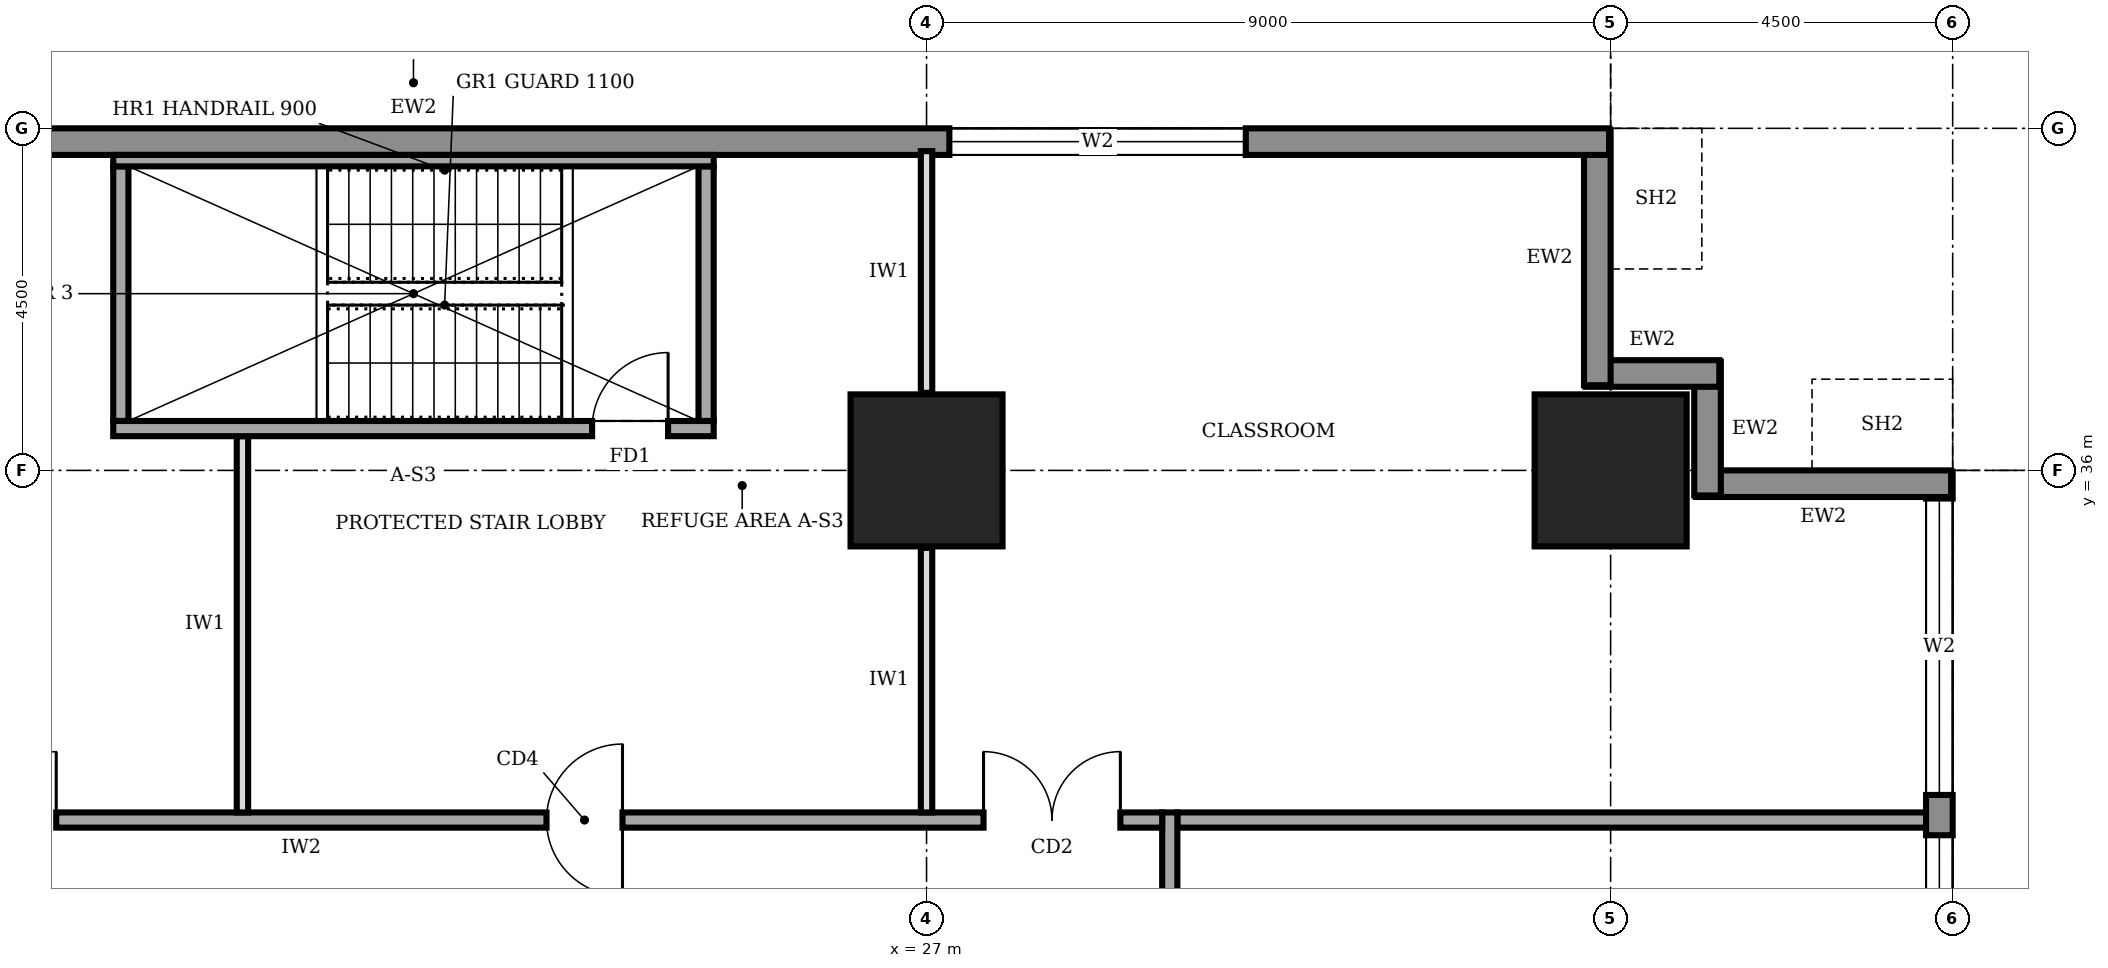
"""IFC4 building model, lengths in metres.
Left out: names, types, materials, properties, quantities, classifications, styles, units other than length and angle.
Written with IfcOpenShell. Run it as: python <this file> out.ifc"""

import sys

from ifc_helpers import new_model, si_unit, direction, frame, frame_2d, origin, origin_2d, place, context, subcontext, project, spatial, rectangle, extrude, element, fill, save


model = new_model("IFC4")
c1 = context("Model", 3, precision=1e-05, world=origin(), true_north=direction((0.0, 1.0)))
c2 = subcontext(c1, "Body", "Model", "MODEL_VIEW")
j1 = project(units=[si_unit("LENGTHUNIT", "METRE"), si_unit("PLANEANGLEUNIT", "RADIAN")], contexts=[c1])
p1 = place(None, origin())
s1 = spatial("IfcSite", under=j1, at=p1, CompositionType="ELEMENT")
p2 = place(p1, origin())
s2 = spatial("IfcBuilding", under=s1, at=p2, CompositionType="ELEMENT")
p3 = place(p2, frame((0.0, 0.0, 61.0)))
s3 = spatial("IfcBuildingStorey", under=s2, at=p3, CompositionType="ELEMENT", Elevation=61.0)
for number, where, z_axis, x_axis in (
    (1, (27.0, 36.0, 0.0), (0.0, 0.0, 1.0), (1.0, 0.0, 0.0)),
    (2, (36.0, 36.0, 0.0), (0.0, 0.0, 1.0), (1.0, 0.0, 0.0)),
):
    element("IfcColumn", number, at=place(p3, frame(where, z_axis=z_axis, x_axis=x_axis)), inside=s3, PredefinedType="COLUMN", context=c2, shape_type="SweptSolid", body=[
        extrude(rectangle(XDim=2.0, YDim=2.0, at=origin_2d()), origin(), (0.0, 0.0, 1.0), 4.0),
    ])
p4 = place(p3, frame((40.325, 4.52, 0.0), z_axis=(0.0, 0.0, 1.0), x_axis=(0.0, 1.0, 0.0)))
e3 = element("IfcWall", 3, at=p4, inside=s3, PredefinedType="STANDARD", context=c2, shape_type="SweptSolid", body=[
    extrude(rectangle(XDim=31.46, YDim=0.35, at=frame_2d((15.73, 0.0))), origin(), (0.0, 0.0, 1.0), 3.75),
])
p5 = place(p4, frame((4.78, 0.0, 0.6)))
e4 = element("IfcOpeningElement", 4, at=p5, cuts=e3, PredefinedType="OPENING", context=c2, shape_type="SweptSolid", body=[
    extrude(rectangle(XDim=3.9, YDim=2.6, at=frame_2d((1.95, 1.3))), frame((0.0, 0.185, 0.0), z_axis=(0.0, -1.0, 0.0), x_axis=(1.0, 0.0, 0.0)), (0.0, 0.0, 1.0), 0.37),
])
p6 = place(p4, frame((9.28, 0.0, 0.6)))
e5 = element("IfcOpeningElement", 5, at=p6, cuts=e3, PredefinedType="OPENING", context=c2, shape_type="SweptSolid", body=[
    extrude(rectangle(XDim=3.9, YDim=2.6, at=frame_2d((1.95, 1.3))), frame((0.0, 0.185, 0.0), z_axis=(0.0, -1.0, 0.0), x_axis=(1.0, 0.0, 0.0)), (0.0, 0.0, 1.0), 0.37),
])
p7 = place(p4, frame((13.78, 0.0, 0.6)))
e6 = element("IfcOpeningElement", 6, at=p7, cuts=e3, PredefinedType="OPENING", context=c2, shape_type="SweptSolid", body=[
    extrude(rectangle(XDim=3.9, YDim=2.6, at=frame_2d((1.95, 1.3))), frame((0.0, 0.185, 0.0), z_axis=(0.0, -1.0, 0.0), x_axis=(1.0, 0.0, 0.0)), (0.0, 0.0, 1.0), 0.37),
])
p8 = place(p4, frame((18.28, 0.0, 0.6)))
e7 = element("IfcOpeningElement", 7, at=p8, cuts=e3, PredefinedType="OPENING", context=c2, shape_type="SweptSolid", body=[
    extrude(rectangle(XDim=3.9, YDim=2.6, at=frame_2d((1.95, 1.3))), frame((0.0, 0.185, 0.0), z_axis=(0.0, -1.0, 0.0), x_axis=(1.0, 0.0, 0.0)), (0.0, 0.0, 1.0), 0.37),
])
p9 = place(p4, frame((22.78, 0.0, 0.6)))
e8 = element("IfcOpeningElement", 8, at=p9, cuts=e3, PredefinedType="OPENING", context=c2, shape_type="SweptSolid", body=[
    extrude(rectangle(XDim=3.9, YDim=2.6, at=frame_2d((1.95, 1.3))), frame((0.0, 0.185, 0.0), z_axis=(0.0, -1.0, 0.0), x_axis=(1.0, 0.0, 0.0)), (0.0, 0.0, 1.0), 0.37),
])
p10 = place(p4, frame((27.21, 0.0, 0.6)))
e9 = element("IfcOpeningElement", 9, at=p10, cuts=e3, PredefinedType="OPENING", context=c2, shape_type="SweptSolid", body=[
    extrude(rectangle(XDim=3.9, YDim=2.6, at=frame_2d((1.95, 1.3))), frame((0.0, 0.185, 0.0), z_axis=(0.0, -1.0, 0.0), x_axis=(1.0, 0.0, 0.0)), (0.0, 0.0, 1.0), 0.37),
])
p11 = place(p3, frame((40.48, 35.825, 0.0), z_axis=(0.0, 0.0, 1.0), x_axis=(-1.0, 0.0, 0.0)))
e10 = element("IfcWall", 10, at=p11, inside=s3, PredefinedType="STANDARD", context=c2, shape_type="SweptSolid", body=[
    extrude(rectangle(XDim=3.36, YDim=0.35, at=frame_2d((1.68, 0.0))), origin(), (0.0, 0.0, 1.0), 2.85),
])
for number, where, z_axis, x_axis in (
    (11, (37.275, 35.67, 0.0), (0.0, 0.0, 1.0), (0.0, 1.0, 0.0)),
    (12, (37.43, 37.275, 0.0), (0.0, 0.0, 1.0), (-1.0, 0.0, 0.0)),
):
    element("IfcWall", number, at=place(p3, frame(where, z_axis=z_axis, x_axis=x_axis)), inside=s3, PredefinedType="STANDARD", context=c2, shape_type="SweptSolid", body=[
        extrude(rectangle(XDim=1.76, YDim=0.35, at=frame_2d((0.88, 0.0))), origin(), (0.0, 0.0, 1.0), 3.75),
    ])
p12 = place(p3, frame((35.825, 37.12, 0.0), z_axis=(0.0, 0.0, 1.0), x_axis=(0.0, 1.0, 0.0)))
e13 = element("IfcWall", 13, at=p12, inside=s3, PredefinedType="STANDARD", context=c2, shape_type="SweptSolid", body=[
    extrude(rectangle(XDim=3.36, YDim=0.35, at=frame_2d((1.68, 0.0))), origin(), (0.0, 0.0, 1.0), 2.85),
])
p13 = place(p3, frame((35.98, 40.325, 0.0), z_axis=(0.0, 0.0, 1.0), x_axis=(-1.0, 0.0, 0.0)))
e14 = element("IfcWall", 14, at=p13, inside=s3, PredefinedType="STANDARD", context=c2, shape_type="SweptSolid", body=[
    extrude(rectangle(XDim=31.46, YDim=0.35, at=frame_2d((15.73, 0.0))), origin(), (0.0, 0.0, 1.0), 3.75),
])
p14 = place(p13, frame((27.21, 0.0, 0.6)))
e15 = element("IfcOpeningElement", 15, at=p14, cuts=e14, PredefinedType="OPENING", context=c2, shape_type="SweptSolid", body=[
    extrude(rectangle(XDim=3.9, YDim=2.6, at=frame_2d((1.95, 1.3))), frame((0.0, 0.185, 0.0), z_axis=(0.0, -1.0, 0.0), x_axis=(1.0, 0.0, 0.0)), (0.0, 0.0, 1.0), 0.37),
])
p15 = place(p13, frame((22.78, 0.0, 0.6)))
e16 = element("IfcOpeningElement", 16, at=p15, cuts=e14, PredefinedType="OPENING", context=c2, shape_type="SweptSolid", body=[
    extrude(rectangle(XDim=3.9, YDim=2.6, at=frame_2d((1.95, 1.3))), frame((0.0, 0.185, 0.0), z_axis=(0.0, -1.0, 0.0), x_axis=(1.0, 0.0, 0.0)), (0.0, 0.0, 1.0), 0.37),
])
p16 = place(p13, frame((4.78, 0.0, 0.6)))
e17 = element("IfcOpeningElement", 17, at=p16, cuts=e14, PredefinedType="OPENING", context=c2, shape_type="SweptSolid", body=[
    extrude(rectangle(XDim=3.9, YDim=2.6, at=frame_2d((1.95, 1.3))), frame((0.0, 0.185, 0.0), z_axis=(0.0, -1.0, 0.0), x_axis=(1.0, 0.0, 0.0)), (0.0, 0.0, 1.0), 0.37),
])
p17 = place(p3, frame((30.2, 9.2, 0.0), z_axis=(0.0, 0.0, 1.0), x_axis=(0.0, 1.0, 0.0)))
e18 = element("IfcWall", 18, at=p17, inside=s3, PredefinedType="SOLIDWALL", context=c2, shape_type="SweptSolid", body=[
    extrude(rectangle(XDim=22.3, YDim=0.2, at=frame_2d((11.15, 0.0))), origin(), (0.0, 0.0, 1.0), 3.75),
])
p18 = place(p17, frame((5.85, 0.0, 0.0)))
e19 = element("IfcOpeningElement", 19, at=p18, cuts=e18, PredefinedType="OPENING", context=c2, shape_type="SweptSolid", body=[
    extrude(rectangle(XDim=1.4, YDim=2.1, at=frame_2d((0.7, 1.05))), frame((0.0, 0.11, 0.0), z_axis=(0.0, -1.0, 0.0), x_axis=(1.0, 0.0, 0.0)), (0.0, 0.0, 1.0), 0.22),
])
p19 = place(p17, frame((17.3, 0.0, 0.0)))
e20 = element("IfcOpeningElement", 20, at=p19, cuts=e18, PredefinedType="OPENING", context=c2, shape_type="SweptSolid", body=[
    extrude(rectangle(XDim=1.0, YDim=2.1, at=frame_2d((0.5, 1.05))), frame((0.0, 0.11, 0.0), z_axis=(0.0, -1.0, 0.0), x_axis=(1.0, 0.0, 0.0)), (0.0, 0.0, 1.0), 0.22),
])
p20 = place(p3, frame((30.1, 31.4, 0.0), z_axis=(0.0, 0.0, 1.0), x_axis=(-1.0, 0.0, 0.0)))
e21 = element("IfcWall", 21, at=p20, inside=s3, PredefinedType="SOLIDWALL", context=c2, shape_type="SweptSolid", body=[
    extrude(rectangle(XDim=18.4, YDim=0.2, at=frame_2d((9.2, 0.0))), origin(), (0.0, 0.0, 1.0), 3.75),
])
p21 = place(p20, frame((14.55, 0.0, 0.0)))
e22 = element("IfcOpeningElement", 22, at=p21, cuts=e21, PredefinedType="OPENING", context=c2, shape_type="SweptSolid", body=[
    extrude(rectangle(XDim=1.4, YDim=2.1, at=frame_2d((0.7, 1.05))), frame((0.0, 0.11, 0.0), z_axis=(0.0, -1.0, 0.0), x_axis=(1.0, 0.0, 0.0)), (0.0, 0.0, 1.0), 0.22),
])
p22 = place(p20, frame((7.1, 0.0, 0.0)))
e23 = element("IfcOpeningElement", 23, at=p22, cuts=e21, PredefinedType="OPENING", context=c2, shape_type="SweptSolid", body=[
    extrude(rectangle(XDim=1.0, YDim=2.1, at=frame_2d((0.5, 1.05))), frame((0.0, 0.11, 0.0), z_axis=(0.0, -1.0, 0.0), x_axis=(1.0, 0.0, 0.0)), (0.0, 0.0, 1.0), 0.22),
])
p23 = place(p20, frame((0.55, 0.0, 0.0)))
e24 = element("IfcOpeningElement", 24, at=p23, cuts=e21, PredefinedType="OPENING", context=c2, shape_type="SweptSolid", body=[
    extrude(rectangle(XDim=1.8, YDim=2.1, at=frame_2d((0.9, 1.05))), frame((0.0, 0.11, 0.0), z_axis=(0.0, -1.0, 0.0), x_axis=(1.0, 0.0, 0.0)), (0.0, 0.0, 1.0), 0.22),
])
p24 = place(p3, frame((30.3, 31.4, 0.0), z_axis=(0.0, 0.0, 1.0), x_axis=(1.0, 0.0, 0.0)))
e25 = element("IfcWall", 25, at=p24, inside=s3, PredefinedType="SOLIDWALL", context=c2, shape_type="SweptSolid", body=[
    extrude(rectangle(XDim=9.9, YDim=0.2, at=frame_2d((4.95, 0.0))), origin(), (0.0, 0.0, 1.0), 3.75),
])
p25 = place(p3, frame((18.0, 31.5, 0.0), z_axis=(0.0, 0.0, 1.0), x_axis=(0.0, 1.0, 0.0)))
e26 = element("IfcWall", 26, at=p25, inside=s3, PredefinedType="PARTITIONING", context=c2, shape_type="SweptSolid", body=[
    extrude(rectangle(XDim=4.95, YDim=0.15, at=frame_2d((2.475, 0.0))), origin(), (0.0, 0.0, 1.0), 3.75),
])
p26 = place(p3, frame((27.0, 31.5, 0.0), z_axis=(0.0, 0.0, 1.0), x_axis=(0.0, 1.0, 0.0)))
e27 = element("IfcWall", 27, at=p26, inside=s3, PredefinedType="PARTITIONING", context=c2, shape_type="SweptSolid", body=[
    extrude(rectangle(XDim=3.48, YDim=0.15, at=frame_2d((1.74, 0.0))), origin(), (0.0, 0.0, 1.0), 2.85),
])
p27 = place(p3, frame((27.0, 37.02, 0.0), z_axis=(0.0, 0.0, 1.0), x_axis=(0.0, 1.0, 0.0)))
e28 = element("IfcWall", 28, at=p27, inside=s3, PredefinedType="PARTITIONING", context=c2, shape_type="SweptSolid", body=[
    extrude(rectangle(XDim=3.18, YDim=0.15, at=frame_2d((1.59, 0.0))), origin(), (0.0, 0.0, 1.0), 2.85),
])
p28 = place(p3, frame((16.3, 36.55, 0.0), z_axis=(0.0, 0.0, 1.0), x_axis=(1.0, 0.0, 0.0)))
e29 = element("IfcWall", 29, at=p28, inside=s3, PredefinedType="SOLIDWALL", context=c2, shape_type="SweptSolid", body=[
    extrude(rectangle(XDim=7.9, YDim=0.2, at=frame_2d((3.95, 0.0))), origin(), (0.0, 0.0, 1.0), 3.75),
])
p29 = place(p28, frame((6.3, 0.0, 0.0)))
e30 = element("IfcOpeningElement", 30, at=p29, cuts=e29, PredefinedType="OPENING", context=c2, shape_type="SweptSolid", body=[
    extrude(rectangle(XDim=1.0, YDim=2.1, at=frame_2d((0.5, 1.05))), frame((0.0, 0.11, 0.0), z_axis=(0.0, -1.0, 0.0), x_axis=(1.0, 0.0, 0.0)), (0.0, 0.0, 1.0), 0.22),
])
p30 = place(p3, frame((16.3, 40.075, 0.0), z_axis=(0.0, 0.0, 1.0), x_axis=(1.0, 0.0, 0.0)))
e31 = element("IfcWall", 31, at=p30, inside=s3, PredefinedType="SOLIDWALL", context=c2, shape_type="SweptSolid", body=[
    extrude(rectangle(XDim=7.9, YDim=0.15, at=frame_2d((3.95, 0.0))), origin(), (0.0, 0.0, 1.0), 3.75),
])
for number, where, z_axis, x_axis in (
    (32, (16.4, 36.65, 0.0), (0.0, 0.0, 1.0), (0.0, 1.0, 0.0)),
    (33, (24.1, 36.65, 0.0), (0.0, 0.0, 1.0), (0.0, 1.0, 0.0)),
):
    element("IfcWall", number, at=place(p3, frame(where, z_axis=z_axis, x_axis=x_axis)), inside=s3, PredefinedType="SOLIDWALL", context=c2, shape_type="SweptSolid", body=[
        extrude(rectangle(XDim=3.35, YDim=0.2, at=frame_2d((1.675, 0.0))), origin(), (0.0, 0.0, 1.0), 3.75),
    ])
p31 = place(p9, origin())
e34 = element("IfcWindow", 34, at=p31, inside=s3, PartitioningType="SINGLE_PANEL", PredefinedType="WINDOW", context=c2, shape_type="SweptSolid", body=[
    extrude(rectangle(XDim=3.9, YDim=2.6, at=frame_2d((1.95, 1.3))), frame((0.0, 0.03, 0.0), z_axis=(0.0, -1.0, 0.0), x_axis=(1.0, 0.0, 0.0)), (0.0, 0.0, 1.0), 0.06),
])
fill(e8, e34)
p32 = place(p10, origin())
e35 = element("IfcWindow", 35, at=p32, inside=s3, PartitioningType="SINGLE_PANEL", PredefinedType="WINDOW", context=c2, shape_type="SweptSolid", body=[
    extrude(rectangle(XDim=3.9, YDim=2.6, at=frame_2d((1.95, 1.3))), frame((0.0, 0.03, 0.0), z_axis=(0.0, -1.0, 0.0), x_axis=(1.0, 0.0, 0.0)), (0.0, 0.0, 1.0), 0.06),
])
fill(e9, e35)
p33 = place(p16, origin())
e36 = element("IfcWindow", 36, at=p33, inside=s3, PartitioningType="SINGLE_PANEL", PredefinedType="WINDOW", context=c2, shape_type="SweptSolid", body=[
    extrude(rectangle(XDim=3.9, YDim=2.6, at=frame_2d((1.95, 1.3))), frame((0.0, 0.03, 0.0), z_axis=(0.0, -1.0, 0.0), x_axis=(1.0, 0.0, 0.0)), (0.0, 0.0, 1.0), 0.06),
])
fill(e17, e36)
p34 = place(p21, frame((1.4, 0.0, 0.0), z_axis=(0.0, 0.0, 1.0), x_axis=(-1.0, 0.0, 0.0)))
e37 = element("IfcDoor", 37, at=p34, inside=s3, OperationType="DOUBLE_DOOR_SINGLE_SWING", PredefinedType="DOOR", context=c2, shape_type="SweptSolid", body=[
    extrude(rectangle(XDim=1.4, YDim=2.1, at=frame_2d((0.7, 1.05))), frame((0.0, 0.025, 0.0), z_axis=(0.0, -1.0, 0.0), x_axis=(1.0, 0.0, 0.0)), (0.0, 0.0, 1.0), 0.05),
])
fill(e22, e37)
p35 = place(p22, origin())
e38 = element("IfcDoor", 38, at=p35, inside=s3, OperationType="DOUBLE_SWING_LEFT", PredefinedType="DOOR", context=c2, shape_type="SweptSolid", body=[
    extrude(rectangle(XDim=1.0, YDim=2.1, at=frame_2d((0.5, 1.05))), frame((0.0, 0.025, 0.0), z_axis=(0.0, -1.0, 0.0), x_axis=(1.0, 0.0, 0.0)), (0.0, 0.0, 1.0), 0.05),
])
fill(e23, e38)
p36 = place(p23, frame((1.8, 0.0, 0.0), z_axis=(0.0, 0.0, 1.0), x_axis=(-1.0, 0.0, 0.0)))
e39 = element("IfcDoor", 39, at=p36, inside=s3, OperationType="DOUBLE_DOOR_SINGLE_SWING", PredefinedType="DOOR", context=c2, shape_type="SweptSolid", body=[
    extrude(rectangle(XDim=1.8, YDim=2.1, at=frame_2d((0.9, 1.05))), frame((0.0, 0.025, 0.0), z_axis=(0.0, -1.0, 0.0), x_axis=(1.0, 0.0, 0.0)), (0.0, 0.0, 1.0), 0.05),
])
fill(e24, e39)
p37 = place(p29, origin())
e40 = element("IfcDoor", 40, at=p37, inside=s3, OperationType="SINGLE_SWING_RIGHT", PredefinedType="DOOR", context=c2, shape_type="SweptSolid", body=[
    extrude(rectangle(XDim=1.0, YDim=2.1, at=frame_2d((0.5, 1.05))), frame((0.0, 0.025, 0.0), z_axis=(0.0, -1.0, 0.0), x_axis=(1.0, 0.0, 0.0)), (0.0, 0.0, 1.0), 0.05),
])
fill(e30, e40)
save(model, sys.argv[1])
